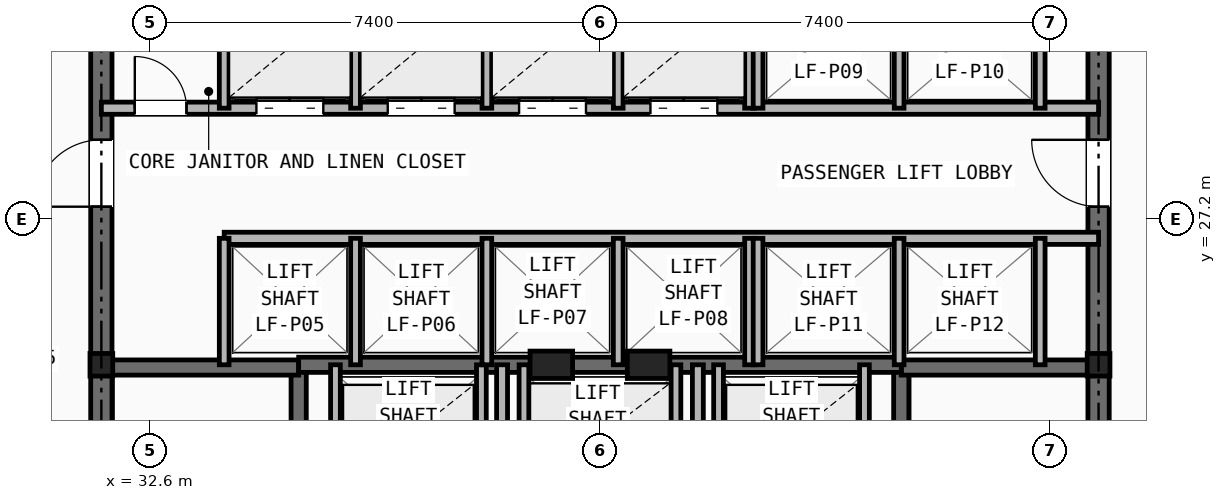
"""IFC4 building model, lengths in metres.
Left out: names, types, materials, properties, quantities, classifications, styles, units other than length and angle.
Written with IfcOpenShell. Run it as: python <this file> out.ifc"""

import sys

from ifc_helpers import new_model, si_unit, direction, frame, frame_2d, origin, origin_2d, place, context, subcontext, project, spatial, rectangle, i_section, extrude, element, fill, save


model = new_model("IFC4")
c1 = context("Model", 3, precision=1e-05, world=origin(), true_north=direction((0.0, 1.0)))
c2 = subcontext(c1, "Body", "Model", "MODEL_VIEW")
j1 = project(units=[si_unit("LENGTHUNIT", "METRE"), si_unit("PLANEANGLEUNIT", "RADIAN")], contexts=[c1])
p1 = place(None, origin())
s1 = spatial("IfcSite", under=j1, at=p1, CompositionType="ELEMENT")
p2 = place(p1, origin())
s2 = spatial("IfcBuilding", under=s1, at=p2, CompositionType="ELEMENT")
p3 = place(p2, frame((0.0, 0.0, 105.4)))
s3 = spatial("IfcBuildingStorey", under=s2, at=p3, CompositionType="ELEMENT", Elevation=105.4)
for number, where, z_axis, x_axis in (
    (1, (31.8, 24.8, 0.0), (0.0, 0.0, 1.0), (1.0, 0.0, 0.0)),
    (2, (48.2, 24.8, 0.0), (0.0, 0.0, 1.0), (1.0, 0.0, 0.0)),
):
    element("IfcColumn", number, at=place(p3, frame(where, z_axis=z_axis, x_axis=x_axis)), inside=s3, PredefinedType="COLUMN", context=c2, shape_type="SweptSolid", body=[
        extrude(i_section(OverallWidth=0.374, OverallDepth=0.372, WebThickness=0.016, FlangeThickness=0.026, at=origin_2d()), origin(), (0.0, 0.0, 1.0), 3.2),
    ])
for number, where, z_axis, x_axis in (
    (3, (39.2, 24.8, 0.0), (0.0, 0.0, 1.0), (1.0, 0.0, 0.0)),
    (4, (40.8, 24.8, 0.0), (0.0, 0.0, 1.0), (1.0, 0.0, 0.0)),
):
    element("IfcColumn", number, at=place(p3, frame(where, z_axis=z_axis, x_axis=x_axis)), inside=s3, PredefinedType="PILASTER", context=c2, shape_type="SweptSolid", body=[
        extrude(rectangle(XDim=0.7, YDim=0.45, at=origin_2d()), origin(), (0.0, 0.0, 1.0), 3.2),
    ])
p4 = place(p3, frame((31.8, 16.4, 0.0), z_axis=(0.0, 0.0, 1.0), x_axis=(0.0, 1.0, 0.0)))
e5 = element("IfcWall", 5, at=p4, inside=s3, PredefinedType="SHEAR", context=c2, shape_type="SweptSolid", body=[
    extrude(rectangle(XDim=14.8, YDim=0.35, at=frame_2d((7.4, 0.0))), origin(), (0.0, 0.0, 1.0), 2.97),
])
p5 = place(p4, frame((11.0, 0.0, 0.0)))
e6 = element("IfcOpeningElement", 6, at=p5, cuts=e5, PredefinedType="OPENING", context=c2, shape_type="SweptSolid", body=[
    extrude(rectangle(XDim=1.1, YDim=2.15, at=frame_2d((0.55, 1.075))), frame((0.0, 0.185, 0.0), z_axis=(0.0, -1.0, 0.0), x_axis=(1.0, 0.0, 0.0)), (0.0, 0.0, 1.0), 0.37),
])
p6 = place(p3, frame((48.2, 16.4, 0.0), z_axis=(0.0, 0.0, 1.0), x_axis=(0.0, 1.0, 0.0)))
e7 = element("IfcWall", 7, at=p6, inside=s3, PredefinedType="SHEAR", context=c2, shape_type="SweptSolid", body=[
    extrude(rectangle(XDim=14.8, YDim=0.35, at=frame_2d((7.4, 0.0))), origin(), (0.0, 0.0, 1.0), 2.97),
])
p7 = place(p6, frame((11.0, 0.0, 0.0)))
e8 = element("IfcOpeningElement", 8, at=p7, cuts=e7, PredefinedType="OPENING", context=c2, shape_type="SweptSolid", body=[
    extrude(rectangle(XDim=1.1, YDim=2.15, at=frame_2d((0.55, 1.075))), frame((0.0, 0.185, 0.0), z_axis=(0.0, -1.0, 0.0), x_axis=(1.0, 0.0, 0.0)), (0.0, 0.0, 1.0), 0.37),
])
p8 = place(p3, frame((35.045, 16.4, 0.0), z_axis=(0.0, 0.0, 1.0), x_axis=(0.0, 1.0, 0.0)))
e9 = element("IfcWall", 9, at=p8, inside=s3, PredefinedType="SHEAR", context=c2, shape_type="SweptSolid", body=[
    extrude(rectangle(XDim=8.4, YDim=0.25, at=frame_2d((4.2, 0.0))), origin(), (0.0, 0.0, 1.0), 2.97),
])
p9 = place(p8, frame((0.45, 0.0, 0.0)))
e10 = element("IfcOpeningElement", 10, at=p9, cuts=e9, PredefinedType="OPENING", context=c2, shape_type="SweptSolid", body=[
    extrude(rectangle(XDim=0.95, YDim=2.1, at=frame_2d((0.475, 1.05))), frame((0.0, 0.135, 0.0), z_axis=(0.0, -1.0, 0.0), x_axis=(1.0, 0.0, 0.0)), (0.0, 0.0, 1.0), 0.27),
])
p10 = place(p3, frame((31.8, 24.755, 0.0), z_axis=(0.0, 0.0, 1.0), x_axis=(1.0, 0.0, 0.0)))
e11 = element("IfcWall", 11, at=p10, inside=s3, PredefinedType="SHEAR", context=c2, shape_type="SweptSolid", body=[
    extrude(rectangle(XDim=3.245, YDim=0.25, at=frame_2d((1.623, 0.0))), origin(), (0.0, 0.0, 1.0), 2.97),
])
p11 = place(p3, frame((44.955, 16.4, 0.0), z_axis=(0.0, 0.0, 1.0), x_axis=(0.0, 1.0, 0.0)))
e12 = element("IfcWall", 12, at=p11, inside=s3, PredefinedType="SHEAR", context=c2, shape_type="SweptSolid", body=[
    extrude(rectangle(XDim=8.4, YDim=0.25, at=frame_2d((4.2, 0.0))), origin(), (0.0, 0.0, 1.0), 2.97),
])
p12 = place(p11, frame((0.45, 0.0, 0.0)))
e13 = element("IfcOpeningElement", 13, at=p12, cuts=e12, PredefinedType="OPENING", context=c2, shape_type="SweptSolid", body=[
    extrude(rectangle(XDim=0.95, YDim=2.1, at=frame_2d((0.475, 1.05))), frame((0.0, 0.135, 0.0), z_axis=(0.0, -1.0, 0.0), x_axis=(1.0, 0.0, 0.0)), (0.0, 0.0, 1.0), 0.27),
])
p13 = place(p3, frame((44.955, 24.755, 0.0), z_axis=(0.0, 0.0, 1.0), x_axis=(1.0, 0.0, 0.0)))
e14 = element("IfcWall", 14, at=p13, inside=s3, PredefinedType="SHEAR", context=c2, shape_type="SweptSolid", body=[
    extrude(rectangle(XDim=3.245, YDim=0.25, at=frame_2d((1.623, 0.0))), origin(), (0.0, 0.0, 1.0), 2.97),
])
p14 = place(p3, frame((35.045, 24.8, 0.0), z_axis=(0.0, 0.0, 1.0), x_axis=(1.0, 0.0, 0.0)))
e15 = element("IfcWall", 15, at=p14, inside=s3, PredefinedType="SHEAR", context=c2, shape_type="SweptSolid", body=[
    extrude(rectangle(XDim=9.91, YDim=0.25, at=frame_2d((4.955, 0.0))), origin(), (0.0, 0.0, 1.0), 2.97),
])
p15 = place(p3, frame((38.39, 16.4, 0.0), z_axis=(0.0, 0.0, 1.0), x_axis=(0.0, 1.0, 0.0)))
e16 = element("IfcWall", 16, at=p15, inside=s3, PredefinedType="PARTITIONING", context=c2, shape_type="SweptSolid", body=[
    extrude(rectangle(XDim=8.4, YDim=0.18, at=frame_2d((4.2, 0.0))), origin(), (0.0, 0.0, 1.0), 2.698),
])
p16 = place(p15, frame((3.8, 0.0, 0.0)))
e17 = element("IfcOpeningElement", 17, at=p16, cuts=e16, PredefinedType="OPENING", context=c2, shape_type="SweptSolid", body=[
    extrude(rectangle(XDim=0.95, YDim=2.1, at=frame_2d((0.475, 1.05))), frame((0.0, 0.1, 0.0), z_axis=(0.0, -1.0, 0.0), x_axis=(1.0, 0.0, 0.0)), (0.0, 0.0, 1.0), 0.2),
])
p17 = place(p3, frame((41.61, 16.4, 0.0), z_axis=(0.0, 0.0, 1.0), x_axis=(0.0, 1.0, 0.0)))
e18 = element("IfcWall", 18, at=p17, inside=s3, PredefinedType="PARTITIONING", context=c2, shape_type="SweptSolid", body=[
    extrude(rectangle(XDim=8.4, YDim=0.18, at=frame_2d((4.2, 0.0))), origin(), (0.0, 0.0, 1.0), 2.698),
])
for number, where, z_axis, x_axis in (
    (19, (35.65, 22.48, 0.0), (0.0, 0.0, 1.0), (0.0, 1.0, 0.0)),
    (20, (38.05, 22.48, 0.0), (0.0, 0.0, 1.0), (0.0, 1.0, 0.0)),
    (21, (41.95, 22.48, 0.0), (0.0, 0.0, 1.0), (0.0, 1.0, 0.0)),
    (22, (44.35, 22.48, 0.0), (0.0, 0.0, 1.0), (0.0, 1.0, 0.0)),
    (23, (38.75, 22.48, 0.0), (0.0, 0.0, 1.0), (0.0, 1.0, 0.0)),
    (24, (41.25, 22.48, 0.0), (0.0, 0.0, 1.0), (0.0, 1.0, 0.0)),
):
    element("IfcWall", number, at=place(p3, frame(where, z_axis=z_axis, x_axis=x_axis)), inside=s3, PredefinedType="SOLIDWALL", context=c2, shape_type="SweptSolid", body=[
        extrude(rectangle(XDim=2.32, YDim=0.16, at=frame_2d((1.16, 0.0))), origin(), (0.0, 0.0, 1.0), 2.97),
    ])
p18 = place(p3, frame((31.8, 29.02, 0.0), z_axis=(0.0, 0.0, 1.0), x_axis=(1.0, 0.0, 0.0)))
e25 = element("IfcWall", 25, at=p18, inside=s3, PredefinedType="SOLIDWALL", context=c2, shape_type="SweptSolid", body=[
    extrude(rectangle(XDim=16.4, YDim=0.2, at=frame_2d((8.2, 0.0))), origin(), (0.0, 0.0, 1.0), 2.421),
])
p19 = place(p18, frame((0.55, 0.0, 0.0)))
e26 = element("IfcOpeningElement", 26, at=p19, cuts=e25, PredefinedType="OPENING", context=c2, shape_type="SweptSolid", body=[
    extrude(rectangle(XDim=0.85, YDim=2.05, at=frame_2d((0.425, 1.025))), frame((0.0, 0.11, 0.0), z_axis=(0.0, -1.0, 0.0), x_axis=(1.0, 0.0, 0.0)), (0.0, 0.0, 1.0), 0.22),
])
p20 = place(p18, frame((2.55, 0.0, 0.0)))
e27 = element("IfcOpeningElement", 27, at=p20, cuts=e25, PredefinedType="OPENING", context=c2, shape_type="SweptSolid", body=[
    extrude(rectangle(XDim=1.1, YDim=2.15, at=frame_2d((0.55, 1.075))), frame((0.0, 0.11, 0.0), z_axis=(0.0, -1.0, 0.0), x_axis=(1.0, 0.0, 0.0)), (0.0, 0.0, 1.0), 0.22),
])
p21 = place(p18, frame((4.71, 0.0, 0.0)))
e28 = element("IfcOpeningElement", 28, at=p21, cuts=e25, PredefinedType="OPENING", context=c2, shape_type="SweptSolid", body=[
    extrude(rectangle(XDim=1.1, YDim=2.15, at=frame_2d((0.55, 1.075))), frame((0.0, 0.11, 0.0), z_axis=(0.0, -1.0, 0.0), x_axis=(1.0, 0.0, 0.0)), (0.0, 0.0, 1.0), 0.22),
])
p22 = place(p18, frame((6.87, 0.0, 0.0)))
e29 = element("IfcOpeningElement", 29, at=p22, cuts=e25, PredefinedType="OPENING", context=c2, shape_type="SweptSolid", body=[
    extrude(rectangle(XDim=1.1, YDim=2.15, at=frame_2d((0.55, 1.075))), frame((0.0, 0.11, 0.0), z_axis=(0.0, -1.0, 0.0), x_axis=(1.0, 0.0, 0.0)), (0.0, 0.0, 1.0), 0.22),
])
p23 = place(p18, frame((9.03, 0.0, 0.0)))
e30 = element("IfcOpeningElement", 30, at=p23, cuts=e25, PredefinedType="OPENING", context=c2, shape_type="SweptSolid", body=[
    extrude(rectangle(XDim=1.1, YDim=2.15, at=frame_2d((0.55, 1.075))), frame((0.0, 0.11, 0.0), z_axis=(0.0, -1.0, 0.0), x_axis=(1.0, 0.0, 0.0)), (0.0, 0.0, 1.0), 0.22),
])
p24 = place(p3, frame((33.82, 26.88, 0.0), z_axis=(0.0, 0.0, 1.0), x_axis=(1.0, 0.0, 0.0)))
e31 = element("IfcWall", 31, at=p24, inside=s3, PredefinedType="SOLIDWALL", context=c2, shape_type="SweptSolid", body=[
    extrude(rectangle(XDim=14.38, YDim=0.2, at=frame_2d((7.19, 0.0))), origin(), (0.0, 0.0, 1.0), 2.421),
])
p25 = place(p3, frame((33.82, 29.02, 0.0), z_axis=(0.0, 0.0, 1.0), x_axis=(0.0, 1.0, 0.0)))
e32 = element("IfcWall", 32, at=p25, inside=s3, PredefinedType="SOLIDWALL", context=c2, shape_type="SweptSolid", body=[
    extrude(rectangle(XDim=2.18, YDim=0.16, at=frame_2d((1.09, 0.0))), origin(), (0.0, 0.0, 1.0), 2.698),
])
p26 = place(p3, frame((33.82, 24.8, 0.0), z_axis=(0.0, 0.0, 1.0), x_axis=(0.0, 1.0, 0.0)))
e33 = element("IfcWall", 33, at=p26, inside=s3, PredefinedType="SOLIDWALL", context=c2, shape_type="SweptSolid", body=[
    extrude(rectangle(XDim=2.08, YDim=0.16, at=frame_2d((1.04, 0.0))), origin(), (0.0, 0.0, 1.0), 2.97),
])
for number, where, z_axis, x_axis in (
    (34, (35.98, 29.02, 0.0), (0.0, 0.0, 1.0), (0.0, 1.0, 0.0)),
    (35, (38.14, 29.02, 0.0), (0.0, 0.0, 1.0), (0.0, 1.0, 0.0)),
    (36, (40.3, 29.02, 0.0), (0.0, 0.0, 1.0), (0.0, 1.0, 0.0)),
    (37, (42.46, 29.02, 0.0), (0.0, 0.0, 1.0), (0.0, 1.0, 0.0)),
):
    element("IfcWall", number, at=place(p3, frame(where, z_axis=z_axis, x_axis=x_axis)), inside=s3, PredefinedType="SOLIDWALL", context=c2, shape_type="SweptSolid", body=[
        extrude(rectangle(XDim=2.18, YDim=0.16, at=frame_2d((1.09, 0.0))), origin(), (0.0, 0.0, 1.0), 2.698),
    ])
for number, where, z_axis, x_axis in (
    (38, (35.98, 24.8, 0.0), (0.0, 0.0, 1.0), (0.0, 1.0, 0.0)),
    (39, (38.14, 24.8, 0.0), (0.0, 0.0, 1.0), (0.0, 1.0, 0.0)),
    (40, (40.3, 24.8, 0.0), (0.0, 0.0, 1.0), (0.0, 1.0, 0.0)),
    (41, (42.46, 24.8, 0.0), (0.0, 0.0, 1.0), (0.0, 1.0, 0.0)),
):
    element("IfcWall", number, at=place(p3, frame(where, z_axis=z_axis, x_axis=x_axis)), inside=s3, PredefinedType="SOLIDWALL", context=c2, shape_type="SweptSolid", body=[
        extrude(rectangle(XDim=2.08, YDim=0.16, at=frame_2d((1.04, 0.0))), origin(), (0.0, 0.0, 1.0), 2.97),
    ])
for number, where, z_axis, x_axis in (
    (42, (42.6, 29.02, 0.0), (0.0, 0.0, 1.0), (0.0, 1.0, 0.0)),
    (43, (44.92, 29.02, 0.0), (0.0, 0.0, 1.0), (0.0, 1.0, 0.0)),
    (44, (47.24, 29.02, 0.0), (0.0, 0.0, 1.0), (0.0, 1.0, 0.0)),
):
    element("IfcWall", number, at=place(p3, frame(where, z_axis=z_axis, x_axis=x_axis)), inside=s3, PredefinedType="SOLIDWALL", context=c2, shape_type="SweptSolid", body=[
        extrude(rectangle(XDim=2.18, YDim=0.16, at=frame_2d((1.09, 0.0))), origin(), (0.0, 0.0, 1.0), 2.698),
    ])
for number, where, z_axis, x_axis in (
    (45, (42.6, 24.8, 0.0), (0.0, 0.0, 1.0), (0.0, 1.0, 0.0)),
    (46, (44.92, 24.8, 0.0), (0.0, 0.0, 1.0), (0.0, 1.0, 0.0)),
    (47, (47.24, 24.8, 0.0), (0.0, 0.0, 1.0), (0.0, 1.0, 0.0)),
):
    element("IfcWall", number, at=place(p3, frame(where, z_axis=z_axis, x_axis=x_axis)), inside=s3, PredefinedType="SOLIDWALL", context=c2, shape_type="SweptSolid", body=[
        extrude(rectangle(XDim=2.08, YDim=0.16, at=frame_2d((1.04, 0.0))), origin(), (0.0, 0.0, 1.0), 2.97),
    ])
p27 = place(p19, origin())
e48 = element("IfcDoor", 48, at=p27, inside=s3, OperationType="SINGLE_SWING_LEFT", PredefinedType="DOOR", context=c2, shape_type="SweptSolid", body=[
    extrude(rectangle(XDim=0.85, YDim=2.05, at=frame_2d((0.425, 1.025))), frame((0.0, 0.025, 0.0), z_axis=(0.0, -1.0, 0.0), x_axis=(1.0, 0.0, 0.0)), (0.0, 0.0, 1.0), 0.05),
])
fill(e26, e48)
p28 = place(p5, origin())
e49 = element("IfcDoor", 49, at=p28, inside=s3, OperationType="SINGLE_SWING_LEFT", PredefinedType="DOOR", context=c2, shape_type="SweptSolid", body=[
    extrude(rectangle(XDim=1.1, YDim=2.15, at=frame_2d((0.55, 1.075))), frame((0.0, 0.025, 0.0), z_axis=(0.0, -1.0, 0.0), x_axis=(1.0, 0.0, 0.0)), (0.0, 0.0, 1.0), 0.05),
])
fill(e6, e49)
p29 = place(p7, origin())
e50 = element("IfcDoor", 50, at=p29, inside=s3, OperationType="SINGLE_SWING_RIGHT", PredefinedType="DOOR", context=c2, shape_type="SweptSolid", body=[
    extrude(rectangle(XDim=1.1, YDim=2.15, at=frame_2d((0.55, 1.075))), frame((0.0, 0.025, 0.0), z_axis=(0.0, -1.0, 0.0), x_axis=(1.0, 0.0, 0.0)), (0.0, 0.0, 1.0), 0.05),
])
fill(e8, e50)
p30 = place(p20, origin())
e51 = element("IfcDoor", 51, at=p30, inside=s3, OperationType="DOUBLE_DOOR_SLIDING", PredefinedType="DOOR", context=c2, shape_type="SweptSolid", body=[
    extrude(rectangle(XDim=1.1, YDim=2.15, at=frame_2d((0.55, 1.075))), frame((0.0, 0.025, 0.0), z_axis=(0.0, -1.0, 0.0), x_axis=(1.0, 0.0, 0.0)), (0.0, 0.0, 1.0), 0.05),
])
fill(e27, e51)
p31 = place(p21, origin())
e52 = element("IfcDoor", 52, at=p31, inside=s3, OperationType="DOUBLE_DOOR_SLIDING", PredefinedType="DOOR", context=c2, shape_type="SweptSolid", body=[
    extrude(rectangle(XDim=1.1, YDim=2.15, at=frame_2d((0.55, 1.075))), frame((0.0, 0.025, 0.0), z_axis=(0.0, -1.0, 0.0), x_axis=(1.0, 0.0, 0.0)), (0.0, 0.0, 1.0), 0.05),
])
fill(e28, e52)
p32 = place(p22, origin())
e53 = element("IfcDoor", 53, at=p32, inside=s3, OperationType="DOUBLE_DOOR_SLIDING", PredefinedType="DOOR", context=c2, shape_type="SweptSolid", body=[
    extrude(rectangle(XDim=1.1, YDim=2.15, at=frame_2d((0.55, 1.075))), frame((0.0, 0.025, 0.0), z_axis=(0.0, -1.0, 0.0), x_axis=(1.0, 0.0, 0.0)), (0.0, 0.0, 1.0), 0.05),
])
fill(e29, e53)
p33 = place(p23, origin())
e54 = element("IfcDoor", 54, at=p33, inside=s3, OperationType="DOUBLE_DOOR_SLIDING", PredefinedType="DOOR", context=c2, shape_type="SweptSolid", body=[
    extrude(rectangle(XDim=1.1, YDim=2.15, at=frame_2d((0.55, 1.075))), frame((0.0, 0.025, 0.0), z_axis=(0.0, -1.0, 0.0), x_axis=(1.0, 0.0, 0.0)), (0.0, 0.0, 1.0), 0.05),
])
fill(e30, e54)
save(model, sys.argv[1])
